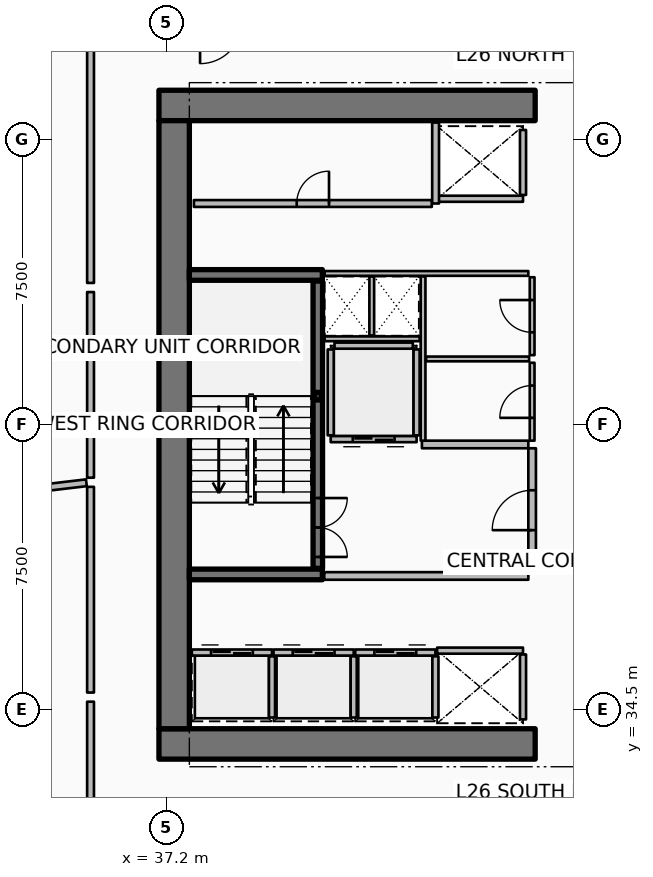
"""IFC4 building model, lengths in metres.
Left out: names, types, materials, properties, quantities, classifications, styles, units other than length and angle.
Written with IfcOpenShell. Run it as: python <this file> out.ifc"""

import sys

from ifc_helpers import new_model, si_unit, direction, frame, frame_2d, origin, origin_2d, place, context, subcontext, project, spatial, rectangle, hollow_rectangle, extrude, element, fill, save


model = new_model("IFC4")
c1 = context("Model", 3, precision=1e-05, world=origin(), true_north=direction((0.0, 1.0)))
c2 = subcontext(c1, "Body", "Model", "MODEL_VIEW")
j1 = project(units=[si_unit("LENGTHUNIT", "METRE"), si_unit("PLANEANGLEUNIT", "RADIAN")], contexts=[c1])
p1 = place(None, origin())
s1 = spatial("IfcSite", under=j1, at=p1, CompositionType="ELEMENT")
p2 = place(p1, origin())
s2 = spatial("IfcBuilding", under=s1, at=p2, CompositionType="ELEMENT")
p3 = place(p2, frame((0.0, 0.0, 105.15)))
s3 = spatial("IfcBuildingStorey", under=s2, at=p3, CompositionType="ELEMENT", Elevation=105.15)
for number, where, z_axis, x_axis in (
    (1, (37.0, 33.6, 0.0), (0.0, 0.0, 1.0), (1.0, 0.0, 0.0)),
    (2, (37.0, 50.4, 0.0), (0.0, 0.0, 1.0), (1.0, 0.0, 0.0)),
):
    element("IfcWall", number, at=place(p3, frame(where, z_axis=z_axis, x_axis=x_axis)), inside=s3, PredefinedType="SHEAR", context=c2, shape_type="SweptSolid", body=[
        extrude(rectangle(XDim=9.9, YDim=0.8, at=frame_2d((4.95, 0.0))), origin(), (0.0, 0.0, 1.0), 3.75),
    ])
p4 = place(p3, frame((37.4, 34.0, 0.0), z_axis=(0.0, 0.0, 1.0), x_axis=(0.0, 1.0, 0.0)))
e3 = element("IfcWall", 3, at=p4, inside=s3, PredefinedType="SHEAR", context=c2, shape_type="SweptSolid", body=[
    extrude(rectangle(XDim=16.0, YDim=0.8, at=frame_2d((8.0, 0.0))), origin(), (0.0, 0.0, 1.0), 3.75),
])
for number, where, z_axis, x_axis in (
    (4, (37.8, 38.06, 0.0), (0.0, 0.0, 1.0), (1.0, 0.0, 0.0)),
    (5, (37.8, 45.94, 0.0), (0.0, 0.0, 1.0), (1.0, 0.0, 0.0)),
):
    element("IfcWall", number, at=place(p3, frame(where, z_axis=z_axis, x_axis=x_axis)), inside=s3, PredefinedType="SHEAR", context=c2, shape_type="SweptSolid", body=[
        extrude(rectangle(XDim=3.5, YDim=0.28, at=frame_2d((1.75, 0.0))), origin(), (0.0, 0.0, 1.0), 3.75),
    ])
p5 = place(p3, frame((41.18, 42.75, 0.0), z_axis=(0.0, 0.0, 1.0), x_axis=(1.0, 0.0, 0.0)))
e6 = element("IfcColumn", 6, at=p5, inside=s3, PredefinedType="COLUMN", context=c2, shape_type="SweptSolid", body=[
    extrude(hollow_rectangle(XDim=0.2, YDim=0.2, WallThickness=0.01, InnerFilletRadius=0.01, OuterFilletRadius=0.02, at=origin_2d()), origin(), (0.0, 0.0, 1.0), 1.67),
])
p6 = place(p3, frame((41.18, 38.22, 0.0), z_axis=(0.0, 0.0, 1.0), x_axis=(0.0, 1.0, 0.0)))
e7 = element("IfcWall", 7, at=p6, inside=s3, PredefinedType="SOLIDWALL", context=c2, shape_type="SweptSolid", body=[
    extrude(rectangle(XDim=7.56, YDim=0.25, at=frame_2d((3.78, 0.0))), origin(), (0.0, 0.0, 1.0), 3.5),
])
p7 = place(p6, frame((0.3, 0.0, 0.0)))
e8 = element("IfcOpeningElement", 8, at=p7, cuts=e7, PredefinedType="OPENING", context=c2, shape_type="SweptSolid", body=[
    extrude(rectangle(XDim=1.55, YDim=2.15, at=frame_2d((0.775, 1.075))), frame((0.0, 0.135, 0.0), z_axis=(0.0, -1.0, 0.0), x_axis=(1.0, 0.0, 0.0)), (0.0, 0.0, 1.0), 0.27),
])
p8 = place(p3, frame((37.865, 36.005, 0.0), z_axis=(0.0, 0.0, 1.0), x_axis=(1.0, 0.0, 0.0)))
e9 = element("IfcWall", 9, at=p8, inside=s3, PredefinedType="PARTITIONING", context=c2, shape_type="SweptSolid", body=[
    extrude(rectangle(XDim=2.11, YDim=0.16, at=frame_2d((1.055, 0.0))), origin(), (0.0, 0.0, 1.0), 3.5),
])
p9 = place(p8, frame((0.505, 0.0, 0.0)))
e10 = element("IfcOpeningElement", 10, at=p9, cuts=e9, PredefinedType="OPENING", context=c2, shape_type="SweptSolid", body=[
    extrude(rectangle(XDim=1.1, YDim=2.1, at=frame_2d((0.55, 1.05))), frame((0.0, 0.09, 0.0), z_axis=(0.0, -1.0, 0.0), x_axis=(1.0, 0.0, 0.0)), (0.0, 0.0, 1.0), 0.18),
])
p10 = place(p3, frame((39.975, 34.295, 0.0), z_axis=(0.0, 0.0, 1.0), x_axis=(0.0, 1.0, 0.0)))
e11 = element("IfcWall", 11, at=p10, inside=s3, PredefinedType="PARTITIONING", context=c2, shape_type="SweptSolid", body=[
    extrude(rectangle(XDim=1.61, YDim=0.16, at=frame_2d((0.805, 0.0))), origin(), (0.0, 0.0, 1.0), 3.5),
])
p11 = place(p3, frame((40.015, 36.005, 0.0), z_axis=(0.0, 0.0, 1.0), x_axis=(1.0, 0.0, 0.0)))
e12 = element("IfcWall", 12, at=p11, inside=s3, PredefinedType="PARTITIONING", context=c2, shape_type="SweptSolid", body=[
    extrude(rectangle(XDim=2.11, YDim=0.16, at=frame_2d((1.055, 0.0))), origin(), (0.0, 0.0, 1.0), 3.5),
])
p12 = place(p11, frame((0.505, 0.0, 0.0)))
e13 = element("IfcOpeningElement", 13, at=p12, cuts=e12, PredefinedType="OPENING", context=c2, shape_type="SweptSolid", body=[
    extrude(rectangle(XDim=1.1, YDim=2.1, at=frame_2d((0.55, 1.05))), frame((0.0, 0.09, 0.0), z_axis=(0.0, -1.0, 0.0), x_axis=(1.0, 0.0, 0.0)), (0.0, 0.0, 1.0), 0.18),
])
p13 = place(p3, frame((42.125, 34.295, 0.0), z_axis=(0.0, 0.0, 1.0), x_axis=(0.0, 1.0, 0.0)))
e14 = element("IfcWall", 14, at=p13, inside=s3, PredefinedType="PARTITIONING", context=c2, shape_type="SweptSolid", body=[
    extrude(rectangle(XDim=1.61, YDim=0.16, at=frame_2d((0.805, 0.0))), origin(), (0.0, 0.0, 1.0), 3.5),
])
p14 = place(p3, frame((42.165, 36.005, 0.0), z_axis=(0.0, 0.0, 1.0), x_axis=(1.0, 0.0, 0.0)))
e15 = element("IfcWall", 15, at=p14, inside=s3, PredefinedType="PARTITIONING", context=c2, shape_type="SweptSolid", body=[
    extrude(rectangle(XDim=2.11, YDim=0.16, at=frame_2d((1.055, 0.0))), origin(), (0.0, 0.0, 1.0), 3.5),
])
p15 = place(p14, frame((0.505, 0.0, 0.0)))
e16 = element("IfcOpeningElement", 16, at=p15, cuts=e15, PredefinedType="OPENING", context=c2, shape_type="SweptSolid", body=[
    extrude(rectangle(XDim=1.1, YDim=2.1, at=frame_2d((0.55, 1.05))), frame((0.0, 0.09, 0.0), z_axis=(0.0, -1.0, 0.0), x_axis=(1.0, 0.0, 0.0)), (0.0, 0.0, 1.0), 0.18),
])
p16 = place(p3, frame((44.275, 34.295, 0.0), z_axis=(0.0, 0.0, 1.0), x_axis=(0.0, 1.0, 0.0)))
e17 = element("IfcWall", 17, at=p16, inside=s3, PredefinedType="PARTITIONING", context=c2, shape_type="SweptSolid", body=[
    extrude(rectangle(XDim=1.61, YDim=0.16, at=frame_2d((0.805, 0.0))), origin(), (0.0, 0.0, 1.0), 3.5),
])
p17 = place(p3, frame((46.58, 47.945, 0.0), z_axis=(0.0, 0.0, 1.0), x_axis=(-1.0, 0.0, 0.0)))
e18 = element("IfcWall", 18, at=p17, inside=s3, PredefinedType="PARTITIONING", context=c2, shape_type="SweptSolid", body=[
    extrude(rectangle(XDim=2.26, YDim=0.16, at=frame_2d((1.13, 0.0))), origin(), (0.0, 0.0, 1.0), 3.5),
])
p18 = place(p3, frame((46.58, 48.045, 0.0), z_axis=(0.0, 0.0, 1.0), x_axis=(0.0, 1.0, 0.0)))
e19 = element("IfcWall", 19, at=p18, inside=s3, PredefinedType="PARTITIONING", context=c2, shape_type="SweptSolid", body=[
    extrude(rectangle(XDim=1.71, YDim=0.16, at=frame_2d((0.855, 0.0))), origin(), (0.0, 0.0, 1.0), 3.5),
])
p19 = place(p3, frame((44.32, 36.055, 0.0), z_axis=(0.0, 0.0, 1.0), x_axis=(1.0, 0.0, 0.0)))
e20 = element("IfcWall", 20, at=p19, inside=s3, PredefinedType="PARTITIONING", context=c2, shape_type="SweptSolid", body=[
    extrude(rectangle(XDim=2.26, YDim=0.16, at=frame_2d((1.13, 0.0))), origin(), (0.0, 0.0, 1.0), 3.5),
])
p20 = place(p3, frame((46.58, 34.245, 0.0), z_axis=(0.0, 0.0, 1.0), x_axis=(0.0, 1.0, 0.0)))
e21 = element("IfcWall", 21, at=p20, inside=s3, PredefinedType="PARTITIONING", context=c2, shape_type="SweptSolid", body=[
    extrude(rectangle(XDim=1.71, YDim=0.16, at=frame_2d((0.855, 0.0))), origin(), (0.0, 0.0, 1.0), 3.5),
])
p21 = place(p3, frame((43.78, 41.62, 0.0), z_axis=(0.0, 0.0, 1.0), x_axis=(-1.0, 0.0, 0.0)))
e22 = element("IfcWall", 22, at=p21, inside=s3, PredefinedType="PARTITIONING", context=c2, shape_type="SweptSolid", body=[
    extrude(rectangle(XDim=2.26, YDim=0.16, at=frame_2d((1.13, 0.0))), origin(), (0.0, 0.0, 1.0), 3.5),
])
p22 = place(p21, frame((0.58, 0.0, 0.0)))
e23 = element("IfcOpeningElement", 23, at=p22, cuts=e22, PredefinedType="OPENING", context=c2, shape_type="SweptSolid", body=[
    extrude(rectangle(XDim=1.1, YDim=2.1, at=frame_2d((0.55, 1.05))), frame((0.0, 0.09, 0.0), z_axis=(0.0, -1.0, 0.0), x_axis=(1.0, 0.0, 0.0)), (0.0, 0.0, 1.0), 0.18),
])
for number, where, z_axis, x_axis in (
    (24, (43.78, 41.72, 0.0), (0.0, 0.0, 1.0), (0.0, 1.0, 0.0)),
    (25, (41.52, 41.72, 0.0), (0.0, 0.0, 1.0), (0.0, 1.0, 0.0)),
):
    element("IfcWall", number, at=place(p3, frame(where, z_axis=z_axis, x_axis=x_axis)), inside=s3, PredefinedType="PARTITIONING", context=c2, shape_type="SweptSolid", body=[
        extrude(rectangle(XDim=2.26, YDim=0.16, at=frame_2d((1.13, 0.0))), origin(), (0.0, 0.0, 1.0), 3.5),
    ])
p23 = place(p3, frame((41.62, 44.08, 0.0), z_axis=(0.0, 0.0, 1.0), x_axis=(1.0, 0.0, 0.0)))
e26 = element("IfcWall", 26, at=p23, inside=s3, PredefinedType="PARTITIONING", context=c2, shape_type="SweptSolid", body=[
    extrude(rectangle(XDim=2.06, YDim=0.16, at=frame_2d((1.03, 0.0))), origin(), (0.0, 0.0, 1.0), 3.5),
])
p24 = place(p3, frame((37.92, 47.82, 0.0), z_axis=(0.0, 0.0, 1.0), x_axis=(1.0, 0.0, 0.0)))
e27 = element("IfcWall", 27, at=p24, inside=s3, PredefinedType="PARTITIONING", context=c2, shape_type="SweptSolid", body=[
    extrude(rectangle(XDim=6.26, YDim=0.18, at=frame_2d((3.13, 0.0))), origin(), (0.0, 0.0, 1.0), 3.5),
])
p25 = place(p24, frame((2.705, 0.0, 0.0)))
e28 = element("IfcOpeningElement", 28, at=p25, cuts=e27, PredefinedType="OPENING", context=c2, shape_type="SweptSolid", body=[
    extrude(rectangle(XDim=0.85, YDim=2.06, at=frame_2d((0.425, 1.03))), frame((0.0, 0.1, 0.0), z_axis=(0.0, -1.0, 0.0), x_axis=(1.0, 0.0, 0.0)), (0.0, 0.0, 1.0), 0.2),
])
p26 = place(p3, frame((44.28, 47.82, 0.0), z_axis=(0.0, 0.0, 1.0), x_axis=(0.0, 1.0, 0.0)))
e29 = element("IfcWall", 29, at=p26, inside=s3, PredefinedType="PARTITIONING", context=c2, shape_type="SweptSolid", body=[
    extrude(rectangle(XDim=2.13, YDim=0.18, at=frame_2d((1.065, 0.0))), origin(), (0.0, 0.0, 1.0), 3.5),
])
p27 = place(p3, frame((41.35, 38.02, 0.0), z_axis=(0.0, 0.0, 1.0), x_axis=(1.0, 0.0, 0.0)))
e30 = element("IfcWall", 30, at=p27, inside=s3, PredefinedType="PARTITIONING", context=c2, shape_type="SweptSolid", body=[
    extrude(rectangle(XDim=5.37, YDim=0.2, at=frame_2d((2.685, 0.0))), origin(), (0.0, 0.0, 1.0), 3.5),
])
p28 = place(p3, frame((43.92, 41.48, 0.0), z_axis=(0.0, 0.0, 1.0), x_axis=(1.0, 0.0, 0.0)))
e31 = element("IfcWall", 31, at=p28, inside=s3, PredefinedType="PARTITIONING", context=c2, shape_type="SweptSolid", body=[
    extrude(rectangle(XDim=2.8, YDim=0.2, at=frame_2d((1.4, 0.0))), origin(), (0.0, 0.0, 1.0), 3.5),
])
p29 = place(p3, frame((46.82, 38.12, 0.0), z_axis=(0.0, 0.0, 1.0), x_axis=(0.0, 1.0, 0.0)))
e32 = element("IfcWall", 32, at=p29, inside=s3, PredefinedType="PARTITIONING", context=c2, shape_type="SweptSolid", body=[
    extrude(rectangle(XDim=3.26, YDim=0.2, at=frame_2d((1.63, 0.0))), origin(), (0.0, 0.0, 1.0), 3.5),
])
p30 = place(p29, frame((1.105, 0.0, 0.0)))
e33 = element("IfcOpeningElement", 33, at=p30, cuts=e32, PredefinedType="OPENING", context=c2, shape_type="SweptSolid", body=[
    extrude(rectangle(XDim=1.05, YDim=2.1, at=frame_2d((0.525, 1.05))), frame((0.0, 0.11, 0.0), z_axis=(0.0, -1.0, 0.0), x_axis=(1.0, 0.0, 0.0)), (0.0, 0.0, 1.0), 0.22),
])
p31 = place(p3, frame((41.36, 45.98, 0.0), z_axis=(0.0, 0.0, 1.0), x_axis=(1.0, 0.0, 0.0)))
e34 = element("IfcWall", 34, at=p31, inside=s3, PredefinedType="PARTITIONING", context=c2, shape_type="SweptSolid", body=[
    extrude(rectangle(XDim=5.36, YDim=0.125, at=frame_2d((2.68, 0.0))), origin(), (0.0, 0.0, 1.0), 2.94),
])
p32 = place(p3, frame((41.36, 44.26, 0.0), z_axis=(0.0, 0.0, 1.0), x_axis=(1.0, 0.0, 0.0)))
e35 = element("IfcWall", 35, at=p32, inside=s3, PredefinedType="PARTITIONING", context=c2, shape_type="SweptSolid", body=[
    extrude(rectangle(XDim=2.5, YDim=0.125, at=frame_2d((1.25, 0.0))), origin(), (0.0, 0.0, 1.0), 2.94),
])
p33 = place(p3, frame((42.6, 44.35, 0.0), z_axis=(0.0, 0.0, 1.0), x_axis=(0.0, 1.0, 0.0)))
e36 = element("IfcWall", 36, at=p33, inside=s3, PredefinedType="PARTITIONING", context=c2, shape_type="SweptSolid", body=[
    extrude(rectangle(XDim=1.55, YDim=0.125, at=frame_2d((0.775, 0.0))), origin(), (0.0, 0.0, 1.0), 2.94),
])
p34 = place(p3, frame((43.95, 41.58, 0.0), z_axis=(0.0, 0.0, 1.0), x_axis=(0.0, 1.0, 0.0)))
e37 = element("IfcWall", 37, at=p34, inside=s3, PredefinedType="PARTITIONING", context=c2, shape_type="SweptSolid", body=[
    extrude(rectangle(XDim=4.32, YDim=0.125, at=frame_2d((2.16, 0.0))), origin(), (0.0, 0.0, 1.0), 2.94),
])
p35 = place(p3, frame((44.03, 43.73, 0.0), z_axis=(0.0, 0.0, 1.0), x_axis=(1.0, 0.0, 0.0)))
e38 = element("IfcWall", 38, at=p35, inside=s3, PredefinedType="PARTITIONING", context=c2, shape_type="SweptSolid", body=[
    extrude(rectangle(XDim=2.71, YDim=0.125, at=frame_2d((1.355, 0.0))), origin(), (0.0, 0.0, 1.0), 2.94),
])
p36 = place(p3, frame((46.82, 41.58, 0.0), z_axis=(0.0, 0.0, 1.0), x_axis=(0.0, 1.0, 0.0)))
e39 = element("IfcWall", 39, at=p36, inside=s3, PredefinedType="PARTITIONING", context=c2, shape_type="SweptSolid", body=[
    extrude(rectangle(XDim=2.05, YDim=0.125, at=frame_2d((1.025, 0.0))), origin(), (0.0, 0.0, 1.0), 2.94),
])
p37 = place(p36, frame((0.6, 0.0, 0.0)))
e40 = element("IfcOpeningElement", 40, at=p37, cuts=e39, PredefinedType="OPENING", context=c2, shape_type="SweptSolid", body=[
    extrude(rectangle(XDim=0.85, YDim=2.06, at=frame_2d((0.425, 1.03))), frame((0.0, 0.073, 0.0), z_axis=(0.0, -1.0, 0.0), x_axis=(1.0, 0.0, 0.0)), (0.0, 0.0, 1.0), 0.145),
])
p38 = place(p3, frame((46.82, 43.83, 0.0), z_axis=(0.0, 0.0, 1.0), x_axis=(0.0, 1.0, 0.0)))
e41 = element("IfcWall", 41, at=p38, inside=s3, PredefinedType="PARTITIONING", context=c2, shape_type="SweptSolid", body=[
    extrude(rectangle(XDim=2.05, YDim=0.125, at=frame_2d((1.025, 0.0))), origin(), (0.0, 0.0, 1.0), 2.94),
])
p39 = place(p38, frame((0.6, 0.0, 0.0)))
e42 = element("IfcOpeningElement", 42, at=p39, cuts=e41, PredefinedType="OPENING", context=c2, shape_type="SweptSolid", body=[
    extrude(rectangle(XDim=0.85, YDim=2.06, at=frame_2d((0.425, 1.03))), frame((0.0, 0.073, 0.0), z_axis=(0.0, -1.0, 0.0), x_axis=(1.0, 0.0, 0.0)), (0.0, 0.0, 1.0), 0.145),
])
p40 = place(p3, frame((35.091, 40.472, 0.0), z_axis=(0.0, 0.0, 1.0), x_axis=(-0.99306845132, -0.117537445069, 0.0)))
e43 = element("IfcWall", 43, at=p40, inside=s3, PredefinedType="PARTITIONING", context=c2, shape_type="SweptSolid", body=[
    extrude(rectangle(XDim=16.48, YDim=0.18, at=frame_2d((8.24, 0.0))), origin(), (0.0, 0.0, 1.0), 2.94),
])
p41 = place(p3, frame((35.2, 51.971, 0.0), z_axis=(0.0, 0.0, 1.0), x_axis=(0.0, -1.0, 0.0)))
e44 = element("IfcWall", 44, at=p41, inside=s3, PredefinedType="PARTITIONING", context=c2, shape_type="SweptSolid", body=[
    extrude(rectangle(XDim=6.241, YDim=0.18, at=frame_2d((3.12, 0.0))), origin(), (0.0, 0.0, 1.0), 2.94),
])
p42 = place(p3, frame((35.2, 45.49, 0.0), z_axis=(0.0, 0.0, 1.0), x_axis=(0.0, -1.0, 0.0)))
e45 = element("IfcWall", 45, at=p42, inside=s3, PredefinedType="PARTITIONING", context=c2, shape_type="SweptSolid", body=[
    extrude(rectangle(XDim=4.885, YDim=0.18, at=frame_2d((2.442, 0.0))), origin(), (0.0, 0.0, 1.0), 2.94),
])
p43 = place(p3, frame((35.2, 40.365, 0.0), z_axis=(0.0, 0.0, 1.0), x_axis=(0.0, -1.0, 0.0)))
e46 = element("IfcWall", 46, at=p43, inside=s3, PredefinedType="PARTITIONING", context=c2, shape_type="SweptSolid", body=[
    extrude(rectangle(XDim=5.413, YDim=0.18, at=frame_2d((2.707, 0.0))), origin(), (0.0, 0.0, 1.0), 2.94),
])
p44 = place(p3, frame((35.2, 34.712, 0.0), z_axis=(0.0, 0.0, 1.0), x_axis=(0.0, -1.0, 0.0)))
e47 = element("IfcWall", 47, at=p44, inside=s3, PredefinedType="PARTITIONING", context=c2, shape_type="SweptSolid", body=[
    extrude(rectangle(XDim=3.192, YDim=0.18, at=frame_2d((1.596, 0.0))), origin(), (0.0, 0.0, 1.0), 2.94),
])
p45 = place(p7, origin())
e48 = element("IfcDoor", 48, at=p45, inside=s3, OperationType="DOUBLE_DOOR_SINGLE_SWING", PredefinedType="DOOR", context=c2, shape_type="SweptSolid", body=[
    extrude(rectangle(XDim=1.55, YDim=2.15, at=frame_2d((0.775, 1.075))), frame((0.0, 0.025, 0.0), z_axis=(0.0, -1.0, 0.0), x_axis=(1.0, 0.0, 0.0)), (0.0, 0.0, 1.0), 0.05),
])
fill(e8, e48)
p46 = place(p9, origin())
e49 = element("IfcDoor", 49, at=p46, inside=s3, OperationType="DOUBLE_DOOR_SLIDING", PredefinedType="DOOR", context=c2, shape_type="SweptSolid", body=[
    extrude(rectangle(XDim=1.1, YDim=2.1, at=frame_2d((0.55, 1.05))), frame((0.0, 0.025, 0.0), z_axis=(0.0, -1.0, 0.0), x_axis=(1.0, 0.0, 0.0)), (0.0, 0.0, 1.0), 0.05),
])
fill(e10, e49)
p47 = place(p12, origin())
e50 = element("IfcDoor", 50, at=p47, inside=s3, OperationType="DOUBLE_DOOR_SLIDING", PredefinedType="DOOR", context=c2, shape_type="SweptSolid", body=[
    extrude(rectangle(XDim=1.1, YDim=2.1, at=frame_2d((0.55, 1.05))), frame((0.0, 0.025, 0.0), z_axis=(0.0, -1.0, 0.0), x_axis=(1.0, 0.0, 0.0)), (0.0, 0.0, 1.0), 0.05),
])
fill(e13, e50)
p48 = place(p15, origin())
e51 = element("IfcDoor", 51, at=p48, inside=s3, OperationType="DOUBLE_DOOR_SLIDING", PredefinedType="DOOR", context=c2, shape_type="SweptSolid", body=[
    extrude(rectangle(XDim=1.1, YDim=2.1, at=frame_2d((0.55, 1.05))), frame((0.0, 0.025, 0.0), z_axis=(0.0, -1.0, 0.0), x_axis=(1.0, 0.0, 0.0)), (0.0, 0.0, 1.0), 0.05),
])
fill(e16, e51)
p49 = place(p22, origin())
e52 = element("IfcDoor", 52, at=p49, inside=s3, OperationType="DOUBLE_DOOR_SLIDING", PredefinedType="DOOR", context=c2, shape_type="SweptSolid", body=[
    extrude(rectangle(XDim=1.1, YDim=2.1, at=frame_2d((0.55, 1.05))), frame((0.0, 0.025, 0.0), z_axis=(0.0, -1.0, 0.0), x_axis=(1.0, 0.0, 0.0)), (0.0, 0.0, 1.0), 0.05),
])
fill(e23, e52)
p50 = place(p25, origin())
e53 = element("IfcDoor", 53, at=p50, inside=s3, OperationType="SINGLE_SWING_RIGHT", PredefinedType="DOOR", context=c2, shape_type="SweptSolid", body=[
    extrude(rectangle(XDim=0.85, YDim=2.06, at=frame_2d((0.425, 1.03))), frame((0.0, 0.025, 0.0), z_axis=(0.0, -1.0, 0.0), x_axis=(1.0, 0.0, 0.0)), (0.0, 0.0, 1.0), 0.05),
])
fill(e28, e53)
p51 = place(p30, origin())
e54 = element("IfcDoor", 54, at=p51, inside=s3, OperationType="SINGLE_SWING_LEFT", PredefinedType="DOOR", context=c2, shape_type="SweptSolid", body=[
    extrude(rectangle(XDim=1.05, YDim=2.1, at=frame_2d((0.525, 1.05))), frame((0.0, 0.025, 0.0), z_axis=(0.0, -1.0, 0.0), x_axis=(1.0, 0.0, 0.0)), (0.0, 0.0, 1.0), 0.05),
])
fill(e33, e54)
p52 = place(p37, origin())
e55 = element("IfcDoor", 55, at=p52, inside=s3, OperationType="SINGLE_SWING_LEFT", PredefinedType="DOOR", context=c2, shape_type="SweptSolid", body=[
    extrude(rectangle(XDim=0.85, YDim=2.06, at=frame_2d((0.425, 1.03))), frame((0.0, 0.025, 0.0), z_axis=(0.0, -1.0, 0.0), x_axis=(1.0, 0.0, 0.0)), (0.0, 0.0, 1.0), 0.05),
])
fill(e40, e55)
p53 = place(p39, origin())
e56 = element("IfcDoor", 56, at=p53, inside=s3, OperationType="SINGLE_SWING_RIGHT", PredefinedType="DOOR", context=c2, shape_type="SweptSolid", body=[
    extrude(rectangle(XDim=0.85, YDim=2.06, at=frame_2d((0.425, 1.03))), frame((0.0, 0.025, 0.0), z_axis=(0.0, -1.0, 0.0), x_axis=(1.0, 0.0, 0.0)), (0.0, 0.0, 1.0), 0.05),
])
fill(e42, e56)
save(model, sys.argv[1])
